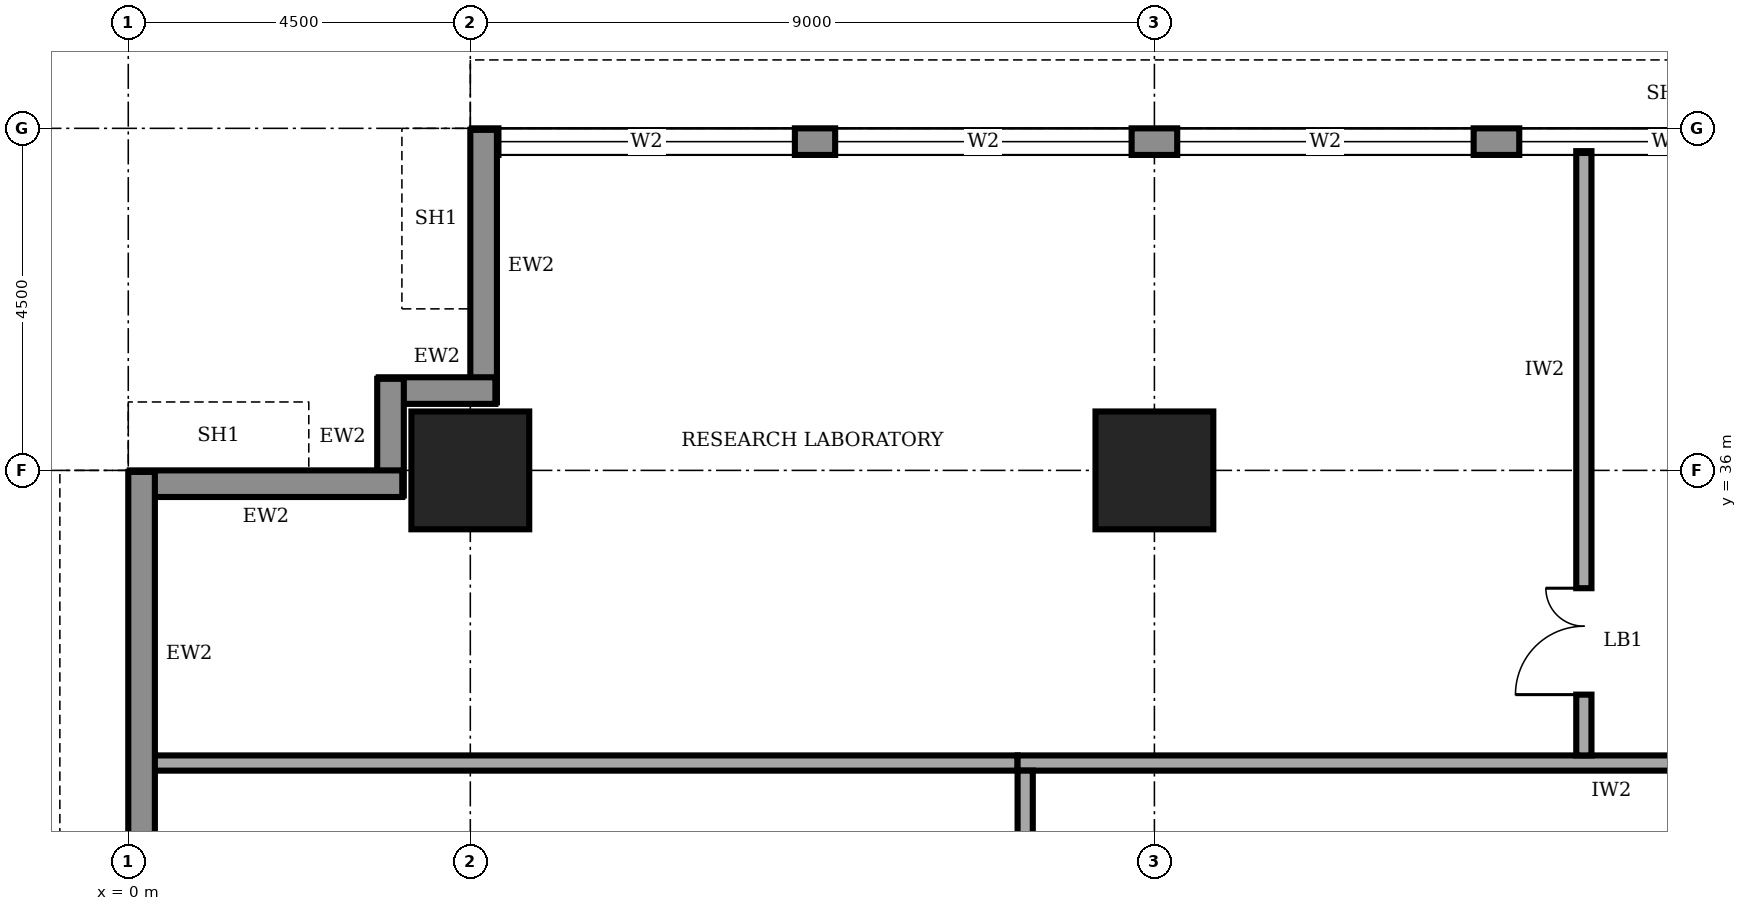
"""IFC4 building model, lengths in metres.
Left out: names, types, materials, properties, quantities, classifications, styles, units other than length and angle.
Written with IfcOpenShell. Run it as: python <this file> out.ifc"""

import sys

from ifc_helpers import new_model, si_unit, direction, frame, frame_2d, origin, origin_2d, place, context, subcontext, project, spatial, rectangle, extrude, element, fill, save


model = new_model("IFC4")
c1 = context("Model", 3, precision=1e-05, world=origin(), true_north=direction((0.0, 1.0)))
c2 = subcontext(c1, "Body", "Model", "MODEL_VIEW")
j1 = project(units=[si_unit("LENGTHUNIT", "METRE"), si_unit("PLANEANGLEUNIT", "RADIAN")], contexts=[c1])
p1 = place(None, origin())
s1 = spatial("IfcSite", under=j1, at=p1, CompositionType="ELEMENT")
p2 = place(p1, origin())
s2 = spatial("IfcBuilding", under=s1, at=p2, CompositionType="ELEMENT")
p3 = place(p2, frame((0.0, 0.0, 237.0)))
s3 = spatial("IfcBuildingStorey", under=s2, at=p3, CompositionType="ELEMENT", Elevation=237.0)
for number, where, z_axis, x_axis in (
    (1, (4.5, 36.0, 0.0), (0.0, 0.0, 1.0), (1.0, 0.0, 0.0)),
    (2, (13.5, 36.0, 0.0), (0.0, 0.0, 1.0), (1.0, 0.0, 0.0)),
):
    element("IfcColumn", number, at=place(p3, frame(where, z_axis=z_axis, x_axis=x_axis)), inside=s3, PredefinedType="COLUMN", context=c2, shape_type="SweptSolid", body=[
        extrude(rectangle(XDim=1.55, YDim=1.55, at=origin_2d()), origin(), (0.0, 0.0, 1.0), 4.0),
    ])
p4 = place(p3, frame((35.98, 40.325, 0.0), z_axis=(0.0, 0.0, 1.0), x_axis=(-1.0, 0.0, 0.0)))
e3 = element("IfcWall", 3, at=p4, inside=s3, PredefinedType="STANDARD", context=c2, shape_type="SweptSolid", body=[
    extrude(rectangle(XDim=31.46, YDim=0.35, at=frame_2d((15.73, 0.0))), origin(), (0.0, 0.0, 1.0), 3.75),
])
p5 = place(p4, frame((27.21, 0.0, 0.6)))
e4 = element("IfcOpeningElement", 4, at=p5, cuts=e3, PredefinedType="OPENING", context=c2, shape_type="SweptSolid", body=[
    extrude(rectangle(XDim=3.9, YDim=2.6, at=frame_2d((1.95, 1.3))), frame((0.0, 0.185, 0.0), z_axis=(0.0, -1.0, 0.0), x_axis=(1.0, 0.0, 0.0)), (0.0, 0.0, 1.0), 0.37),
])
p6 = place(p4, frame((22.78, 0.0, 0.6)))
e5 = element("IfcOpeningElement", 5, at=p6, cuts=e3, PredefinedType="OPENING", context=c2, shape_type="SweptSolid", body=[
    extrude(rectangle(XDim=3.9, YDim=2.6, at=frame_2d((1.95, 1.3))), frame((0.0, 0.185, 0.0), z_axis=(0.0, -1.0, 0.0), x_axis=(1.0, 0.0, 0.0)), (0.0, 0.0, 1.0), 0.37),
])
p7 = place(p4, frame((18.28, 0.0, 0.6)))
e6 = element("IfcOpeningElement", 6, at=p7, cuts=e3, PredefinedType="OPENING", context=c2, shape_type="SweptSolid", body=[
    extrude(rectangle(XDim=3.9, YDim=2.6, at=frame_2d((1.95, 1.3))), frame((0.0, 0.185, 0.0), z_axis=(0.0, -1.0, 0.0), x_axis=(1.0, 0.0, 0.0)), (0.0, 0.0, 1.0), 0.37),
])
p8 = place(p4, frame((13.78, 0.0, 0.6)))
e7 = element("IfcOpeningElement", 7, at=p8, cuts=e3, PredefinedType="OPENING", context=c2, shape_type="SweptSolid", body=[
    extrude(rectangle(XDim=3.9, YDim=2.6, at=frame_2d((1.95, 1.3))), frame((0.0, 0.185, 0.0), z_axis=(0.0, -1.0, 0.0), x_axis=(1.0, 0.0, 0.0)), (0.0, 0.0, 1.0), 0.37),
])
p9 = place(p4, frame((9.28, 0.0, 0.6)))
e8 = element("IfcOpeningElement", 8, at=p9, cuts=e3, PredefinedType="OPENING", context=c2, shape_type="SweptSolid", body=[
    extrude(rectangle(XDim=3.9, YDim=2.6, at=frame_2d((1.95, 1.3))), frame((0.0, 0.185, 0.0), z_axis=(0.0, -1.0, 0.0), x_axis=(1.0, 0.0, 0.0)), (0.0, 0.0, 1.0), 0.37),
])
p10 = place(p4, frame((4.78, 0.0, 0.6)))
e9 = element("IfcOpeningElement", 9, at=p10, cuts=e3, PredefinedType="OPENING", context=c2, shape_type="SweptSolid", body=[
    extrude(rectangle(XDim=3.9, YDim=2.6, at=frame_2d((1.95, 1.3))), frame((0.0, 0.185, 0.0), z_axis=(0.0, -1.0, 0.0), x_axis=(1.0, 0.0, 0.0)), (0.0, 0.0, 1.0), 0.37),
])
p11 = place(p3, frame((4.675, 40.48, 0.0), z_axis=(0.0, 0.0, 1.0), x_axis=(0.0, -1.0, 0.0)))
e10 = element("IfcWall", 10, at=p11, inside=s3, PredefinedType="STANDARD", context=c2, shape_type="SweptSolid", body=[
    extrude(rectangle(XDim=3.585, YDim=0.35, at=frame_2d((1.792, 0.0))), origin(), (0.0, 0.0, 1.0), 2.85),
])
for number, where, z_axis, x_axis in (
    (11, (4.83, 37.05, 0.0), (0.0, 0.0, 1.0), (-1.0, 0.0, 0.0)),
    (12, (3.45, 37.205, 0.0), (0.0, 0.0, 1.0), (0.0, -1.0, 0.0)),
):
    element("IfcWall", number, at=place(p3, frame(where, z_axis=z_axis, x_axis=x_axis)), inside=s3, PredefinedType="STANDARD", context=c2, shape_type="SweptSolid", body=[
        extrude(rectangle(XDim=1.535, YDim=0.35, at=frame_2d((0.768, 0.0))), origin(), (0.0, 0.0, 1.0), 3.75),
    ])
p12 = place(p3, frame((3.605, 35.825, 0.0), z_axis=(0.0, 0.0, 1.0), x_axis=(-1.0, 0.0, 0.0)))
e13 = element("IfcWall", 13, at=p12, inside=s3, PredefinedType="STANDARD", context=c2, shape_type="SweptSolid", body=[
    extrude(rectangle(XDim=3.585, YDim=0.35, at=frame_2d((1.792, 0.0))), origin(), (0.0, 0.0, 1.0), 2.85),
])
p13 = place(p3, frame((0.175, 35.98, 0.0), z_axis=(0.0, 0.0, 1.0), x_axis=(0.0, -1.0, 0.0)))
e14 = element("IfcWall", 14, at=p13, inside=s3, PredefinedType="STANDARD", context=c2, shape_type="SweptSolid", body=[
    extrude(rectangle(XDim=31.46, YDim=0.35, at=frame_2d((15.73, 0.0))), origin(), (0.0, 0.0, 1.0), 3.75),
])
p14 = place(p13, frame((27.21, 0.0, 0.6)))
e15 = element("IfcOpeningElement", 15, at=p14, cuts=e14, PredefinedType="OPENING", context=c2, shape_type="SweptSolid", body=[
    extrude(rectangle(XDim=3.9, YDim=2.6, at=frame_2d((1.95, 1.3))), frame((0.0, 0.185, 0.0), z_axis=(0.0, -1.0, 0.0), x_axis=(1.0, 0.0, 0.0)), (0.0, 0.0, 1.0), 0.37),
])
p15 = place(p13, frame((22.78, 0.0, 0.6)))
e16 = element("IfcOpeningElement", 16, at=p15, cuts=e14, PredefinedType="OPENING", context=c2, shape_type="SweptSolid", body=[
    extrude(rectangle(XDim=3.9, YDim=2.6, at=frame_2d((1.95, 1.3))), frame((0.0, 0.185, 0.0), z_axis=(0.0, -1.0, 0.0), x_axis=(1.0, 0.0, 0.0)), (0.0, 0.0, 1.0), 0.37),
])
p16 = place(p13, frame((18.28, 0.0, 0.6)))
e17 = element("IfcOpeningElement", 17, at=p16, cuts=e14, PredefinedType="OPENING", context=c2, shape_type="SweptSolid", body=[
    extrude(rectangle(XDim=3.9, YDim=2.6, at=frame_2d((1.95, 1.3))), frame((0.0, 0.185, 0.0), z_axis=(0.0, -1.0, 0.0), x_axis=(1.0, 0.0, 0.0)), (0.0, 0.0, 1.0), 0.37),
])
p17 = place(p13, frame((13.78, 0.0, 0.6)))
e18 = element("IfcOpeningElement", 18, at=p17, cuts=e14, PredefinedType="OPENING", context=c2, shape_type="SweptSolid", body=[
    extrude(rectangle(XDim=3.9, YDim=2.6, at=frame_2d((1.95, 1.3))), frame((0.0, 0.185, 0.0), z_axis=(0.0, -1.0, 0.0), x_axis=(1.0, 0.0, 0.0)), (0.0, 0.0, 1.0), 0.37),
])
p18 = place(p13, frame((9.28, 0.0, 0.6)))
e19 = element("IfcOpeningElement", 19, at=p18, cuts=e14, PredefinedType="OPENING", context=c2, shape_type="SweptSolid", body=[
    extrude(rectangle(XDim=3.9, YDim=2.6, at=frame_2d((1.95, 1.3))), frame((0.0, 0.185, 0.0), z_axis=(0.0, -1.0, 0.0), x_axis=(1.0, 0.0, 0.0)), (0.0, 0.0, 1.0), 0.37),
])
p19 = place(p13, frame((4.78, 0.0, 0.6)))
e20 = element("IfcOpeningElement", 20, at=p19, cuts=e14, PredefinedType="OPENING", context=c2, shape_type="SweptSolid", body=[
    extrude(rectangle(XDim=3.9, YDim=2.6, at=frame_2d((1.95, 1.3))), frame((0.0, 0.185, 0.0), z_axis=(0.0, -1.0, 0.0), x_axis=(1.0, 0.0, 0.0)), (0.0, 0.0, 1.0), 0.37),
])
p20 = place(p3, frame((28.6, 32.15, 0.0), z_axis=(0.0, 0.0, 1.0), x_axis=(-1.0, 0.0, 0.0)))
e21 = element("IfcWall", 21, at=p20, inside=s3, PredefinedType="SOLIDWALL", context=c2, shape_type="SweptSolid", body=[
    extrude(rectangle(XDim=16.9, YDim=0.2, at=frame_2d((8.45, 0.0))), origin(), (0.0, 0.0, 1.0), 3.75),
])
p21 = place(p20, frame((0.275, 0.0, 0.0)))
e22 = element("IfcOpeningElement", 22, at=p21, cuts=e21, PredefinedType="OPENING", context=c2, shape_type="SweptSolid", body=[
    extrude(rectangle(XDim=1.0, YDim=2.1, at=frame_2d((0.5, 1.05))), frame((0.0, 0.11, 0.0), z_axis=(0.0, -1.0, 0.0), x_axis=(1.0, 0.0, 0.0)), (0.0, 0.0, 1.0), 0.22),
])
p22 = place(p3, frame((11.8, 32.05, 0.0), z_axis=(0.0, 0.0, 1.0), x_axis=(0.0, -1.0, 0.0)))
e23 = element("IfcWall", 23, at=p22, inside=s3, PredefinedType="SOLIDWALL", context=c2, shape_type="SweptSolid", body=[
    extrude(rectangle(XDim=23.05, YDim=0.2, at=frame_2d((11.525, 0.0))), origin(), (0.0, 0.0, 1.0), 3.75),
])
p23 = place(p22, frame((20.3, 0.0, 0.0)))
e24 = element("IfcOpeningElement", 24, at=p23, cuts=e23, PredefinedType="OPENING", context=c2, shape_type="SweptSolid", body=[
    extrude(rectangle(XDim=1.0, YDim=2.1, at=frame_2d((0.5, 1.05))), frame((0.0, 0.11, 0.0), z_axis=(0.0, -1.0, 0.0), x_axis=(1.0, 0.0, 0.0)), (0.0, 0.0, 1.0), 0.22),
])
p24 = place(p22, frame((16.2, 0.0, 0.0)))
e25 = element("IfcOpeningElement", 25, at=p24, cuts=e23, PredefinedType="OPENING", context=c2, shape_type="SweptSolid", body=[
    extrude(rectangle(XDim=0.9, YDim=2.1, at=frame_2d((0.45, 1.05))), frame((0.0, 0.11, 0.0), z_axis=(0.0, -1.0, 0.0), x_axis=(1.0, 0.0, 0.0)), (0.0, 0.0, 1.0), 0.22),
])
p25 = place(p22, frame((13.2, 0.0, 0.0)))
e26 = element("IfcOpeningElement", 26, at=p25, cuts=e23, PredefinedType="OPENING", context=c2, shape_type="SweptSolid", body=[
    extrude(rectangle(XDim=0.9, YDim=2.1, at=frame_2d((0.45, 1.05))), frame((0.0, 0.11, 0.0), z_axis=(0.0, -1.0, 0.0), x_axis=(1.0, 0.0, 0.0)), (0.0, 0.0, 1.0), 0.22),
])
p26 = place(p22, frame((8.35, 0.0, 0.0)))
e27 = element("IfcOpeningElement", 27, at=p26, cuts=e23, PredefinedType="OPENING", context=c2, shape_type="SweptSolid", body=[
    extrude(rectangle(XDim=0.9, YDim=2.1, at=frame_2d((0.45, 1.05))), frame((0.0, 0.11, 0.0), z_axis=(0.0, -1.0, 0.0), x_axis=(1.0, 0.0, 0.0)), (0.0, 0.0, 1.0), 0.22),
])
p27 = place(p22, frame((5.55, 0.0, 0.0)))
e28 = element("IfcOpeningElement", 28, at=p27, cuts=e23, PredefinedType="OPENING", context=c2, shape_type="SweptSolid", body=[
    extrude(rectangle(XDim=1.0, YDim=2.1, at=frame_2d((0.5, 1.05))), frame((0.0, 0.11, 0.0), z_axis=(0.0, -1.0, 0.0), x_axis=(1.0, 0.0, 0.0)), (0.0, 0.0, 1.0), 0.22),
])
p28 = place(p22, frame((11.05, 0.0, 0.0)))
e29 = element("IfcOpeningElement", 29, at=p28, cuts=e23, PredefinedType="OPENING", context=c2, shape_type="SweptSolid", body=[
    extrude(rectangle(XDim=1.0, YDim=2.1, at=frame_2d((0.5, 1.05))), frame((0.0, 0.11, 0.0), z_axis=(0.0, -1.0, 0.0), x_axis=(1.0, 0.0, 0.0)), (0.0, 0.0, 1.0), 0.22),
])
p29 = place(p22, frame((1.925, 0.0, 0.0)))
e30 = element("IfcOpeningElement", 30, at=p29, cuts=e23, PredefinedType="OPENING", context=c2, shape_type="SweptSolid", body=[
    extrude(rectangle(XDim=1.0, YDim=2.1, at=frame_2d((0.5, 1.05))), frame((0.0, 0.11, 0.0), z_axis=(0.0, -1.0, 0.0), x_axis=(1.0, 0.0, 0.0)), (0.0, 0.0, 1.0), 0.22),
])
p30 = place(p3, frame((19.15, 32.25, 0.0), z_axis=(0.0, 0.0, 1.0), x_axis=(0.0, 1.0, 0.0)))
e31 = element("IfcWall", 31, at=p30, inside=s3, PredefinedType="SOLIDWALL", context=c2, shape_type="SweptSolid", body=[
    extrude(rectangle(XDim=7.95, YDim=0.2, at=frame_2d((3.975, 0.0))), origin(), (0.0, 0.0, 1.0), 3.75),
])
p31 = place(p30, frame((0.8, 0.0, 0.0)))
e32 = element("IfcOpeningElement", 32, at=p31, cuts=e31, PredefinedType="OPENING", context=c2, shape_type="SweptSolid", body=[
    extrude(rectangle(XDim=1.4, YDim=2.1, at=frame_2d((0.7, 1.05))), frame((0.0, 0.11, 0.0), z_axis=(0.0, -1.0, 0.0), x_axis=(1.0, 0.0, 0.0)), (0.0, 0.0, 1.0), 0.22),
])
p32 = place(p3, frame((0.3, 32.15, 0.0), z_axis=(0.0, 0.0, 1.0), x_axis=(1.0, 0.0, 0.0)))
e33 = element("IfcWall", 33, at=p32, inside=s3, PredefinedType="SOLIDWALL", context=c2, shape_type="SweptSolid", body=[
    extrude(rectangle(XDim=11.4, YDim=0.2, at=frame_2d((5.7, 0.0))), origin(), (0.0, 0.0, 1.0), 3.75),
])
p33 = place(p5, origin())
e34 = element("IfcWindow", 34, at=p33, inside=s3, PartitioningType="SINGLE_PANEL", PredefinedType="WINDOW", context=c2, shape_type="SweptSolid", body=[
    extrude(rectangle(XDim=3.9, YDim=2.6, at=frame_2d((1.95, 1.3))), frame((0.0, 0.03, 0.0), z_axis=(0.0, -1.0, 0.0), x_axis=(1.0, 0.0, 0.0)), (0.0, 0.0, 1.0), 0.06),
])
fill(e4, e34)
p34 = place(p6, origin())
e35 = element("IfcWindow", 35, at=p34, inside=s3, PartitioningType="SINGLE_PANEL", PredefinedType="WINDOW", context=c2, shape_type="SweptSolid", body=[
    extrude(rectangle(XDim=3.9, YDim=2.6, at=frame_2d((1.95, 1.3))), frame((0.0, 0.03, 0.0), z_axis=(0.0, -1.0, 0.0), x_axis=(1.0, 0.0, 0.0)), (0.0, 0.0, 1.0), 0.06),
])
fill(e5, e35)
p35 = place(p7, origin())
e36 = element("IfcWindow", 36, at=p35, inside=s3, PartitioningType="SINGLE_PANEL", PredefinedType="WINDOW", context=c2, shape_type="SweptSolid", body=[
    extrude(rectangle(XDim=3.9, YDim=2.6, at=frame_2d((1.95, 1.3))), frame((0.0, 0.03, 0.0), z_axis=(0.0, -1.0, 0.0), x_axis=(1.0, 0.0, 0.0)), (0.0, 0.0, 1.0), 0.06),
])
fill(e6, e36)
p36 = place(p8, origin())
e37 = element("IfcWindow", 37, at=p36, inside=s3, PartitioningType="SINGLE_PANEL", PredefinedType="WINDOW", context=c2, shape_type="SweptSolid", body=[
    extrude(rectangle(XDim=3.9, YDim=2.6, at=frame_2d((1.95, 1.3))), frame((0.0, 0.03, 0.0), z_axis=(0.0, -1.0, 0.0), x_axis=(1.0, 0.0, 0.0)), (0.0, 0.0, 1.0), 0.06),
])
fill(e7, e37)
p37 = place(p31, origin())
e38 = element("IfcDoor", 38, at=p37, inside=s3, OperationType="DOUBLE_DOOR_SINGLE_SWING", PredefinedType="DOOR", context=c2, shape_type="SweptSolid", body=[
    extrude(rectangle(XDim=1.4, YDim=2.1, at=frame_2d((0.7, 1.05))), frame((0.0, 0.025, 0.0), z_axis=(0.0, -1.0, 0.0), x_axis=(1.0, 0.0, 0.0)), (0.0, 0.0, 1.0), 0.05),
])
fill(e32, e38)
save(model, sys.argv[1])
